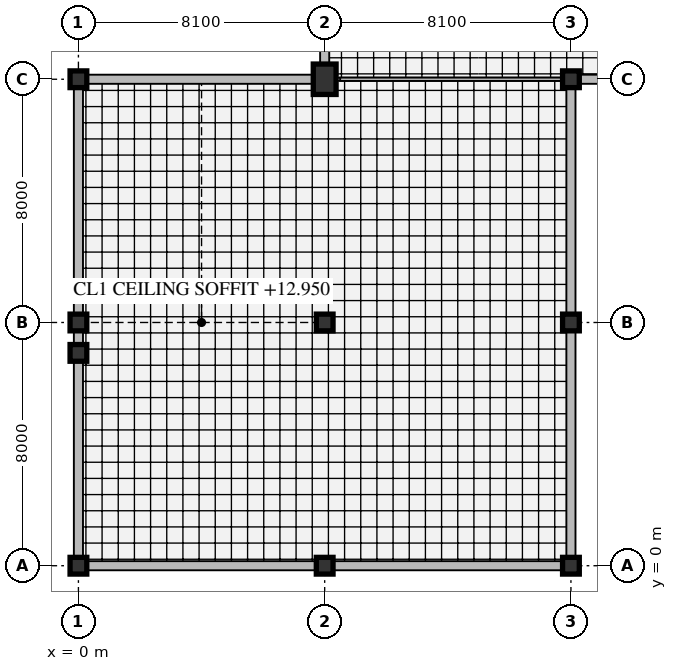
"""IFC4 building model, lengths in metres.
Left out: names, types, materials, properties, quantities, classifications, styles, units other than length and angle.
Written with IfcOpenShell. Run it as: python <this file> out.ifc"""

import sys

from ifc_helpers import new_model, si_unit, direction, frame, frame_2d, origin, origin_with_axes, origin_2d, place, context, subcontext, project, spatial, rectangle, extrude, element, fill, save


model = new_model("IFC4")
c1 = context("Model", 3, precision=1e-05, world=origin(), true_north=direction((0.0, 1.0)))
c2 = subcontext(c1, "Body", "Model", "MODEL_VIEW")
j1 = project(units=[si_unit("LENGTHUNIT", "METRE"), si_unit("PLANEANGLEUNIT", "RADIAN")], contexts=[c1])
p1 = place(None, origin())
s1 = spatial("IfcSite", under=j1, at=p1, CompositionType="ELEMENT")
p2 = place(p1, origin())
s2 = spatial("IfcBuilding", under=s1, at=p2, CompositionType="ELEMENT")
p3 = place(p2, frame((0.0, 0.0, 10.2)))
s3 = spatial("IfcBuildingStorey", under=s2, at=p3, CompositionType="ELEMENT", Elevation=10.2)
p4 = place(p3, origin_with_axes())
e1 = element("IfcColumn", 1, at=p4, inside=s3, PredefinedType="COLUMN", context=c2, shape_type="SweptSolid", body=[
    extrude(rectangle(XDim=0.55, YDim=0.55, at=origin_2d()), origin(), (0.0, 0.0, 1.0), 4.24),
])
for number, where, z_axis, x_axis in (
    (2, (0.0, 7.0, 0.0), (0.0, 0.0, 1.0), (1.0, 0.0, 0.0)),
    (3, (0.0, 8.0, 0.0), (0.0, 0.0, 1.0), (1.0, 0.0, 0.0)),
    (4, (0.0, 16.0, 0.0), (0.0, 0.0, 1.0), (1.0, 0.0, 0.0)),
):
    element("IfcColumn", number, at=place(p3, frame(where, z_axis=z_axis, x_axis=x_axis)), inside=s3, PredefinedType="COLUMN", context=c2, shape_type="SweptSolid", body=[
        extrude(rectangle(XDim=0.55, YDim=0.55, at=origin_2d()), origin(), (0.0, 0.0, 1.0), 4.16),
    ])
p5 = place(p3, frame((8.1, 0.0, 0.0), z_axis=(0.0, 0.0, 1.0), x_axis=(1.0, 0.0, 0.0)))
e5 = element("IfcColumn", 5, at=p5, inside=s3, PredefinedType="COLUMN", context=c2, shape_type="SweptSolid", body=[
    extrude(rectangle(XDim=0.55, YDim=0.55, at=origin_2d()), origin(), (0.0, 0.0, 1.0), 4.24),
])
p6 = place(p3, frame((8.1, 8.0, 0.0), z_axis=(0.0, 0.0, 1.0), x_axis=(1.0, 0.0, 0.0)))
e6 = element("IfcColumn", 6, at=p6, inside=s3, PredefinedType="COLUMN", context=c2, shape_type="SweptSolid", body=[
    extrude(rectangle(XDim=0.55, YDim=0.55, at=origin_2d()), origin(), (0.0, 0.0, 1.0), 4.16),
])
p7 = place(p3, frame((8.1, 16.0, 0.0), z_axis=(0.0, 0.0, 1.0), x_axis=(1.0, 0.0, 0.0)))
e7 = element("IfcColumn", 7, at=p7, inside=s3, PredefinedType="COLUMN", context=c2, shape_type="SweptSolid", body=[
    extrude(rectangle(XDim=0.75, YDim=1.0, at=origin_2d()), origin(), (0.0, 0.0, 1.0), 4.5),
])
for number, where, z_axis, x_axis in (
    (8, (16.2, 0.0, 0.0), (0.0, 0.0, 1.0), (1.0, 0.0, 0.0)),
    (9, (16.2, 8.0, 0.0), (0.0, 0.0, 1.0), (1.0, 0.0, 0.0)),
    (10, (16.2, 16.0, 0.0), (0.0, 0.0, 1.0), (1.0, 0.0, 0.0)),
):
    element("IfcColumn", number, at=place(p3, frame(where, z_axis=z_axis, x_axis=x_axis)), inside=s3, PredefinedType="COLUMN", context=c2, shape_type="SweptSolid", body=[
        extrude(rectangle(XDim=0.55, YDim=0.55, at=origin_2d()), origin(), (0.0, 0.0, 1.0), 4.24),
    ])
p8 = place(p3, frame((0.0, 16.0, 0.0), z_axis=(0.0, 0.0, 1.0), x_axis=(0.0, -1.0, 0.0)))
e11 = element("IfcWall", 11, at=p8, inside=s3, PredefinedType="SOLIDWALL", context=c2, shape_type="SweptSolid", body=[
    extrude(rectangle(XDim=16.0, YDim=0.3, at=frame_2d((8.0, 0.0))), origin(), (0.0, 0.0, 1.0), 3.652),
])
p9 = place(p3, origin_with_axes())
e12 = element("IfcWall", 12, at=p9, inside=s3, PredefinedType="SOLIDWALL", context=c2, shape_type="SweptSolid", body=[
    extrude(rectangle(XDim=16.2, YDim=0.3, at=frame_2d((8.1, 0.0))), origin(), (0.0, 0.0, 1.0), 4.24),
])
p10 = place(p3, frame((16.2, 0.0, 0.0), z_axis=(0.0, 0.0, 1.0), x_axis=(0.0, 1.0, 0.0)))
e13 = element("IfcWall", 13, at=p10, inside=s3, PredefinedType="SOLIDWALL", context=c2, shape_type="SweptSolid", body=[
    extrude(rectangle(XDim=16.0, YDim=0.3, at=frame_2d((8.0, 0.0))), origin(), (0.0, 0.0, 1.0), 3.769),
])
p11 = place(p3, frame((16.2, 16.0, 0.0), z_axis=(0.0, 0.0, 1.0), x_axis=(1.0, 0.0, 0.0)))
e14 = element("IfcWall", 14, at=p11, inside=s3, PredefinedType="SOLIDWALL", context=c2, shape_type="SweptSolid", body=[
    extrude(rectangle(XDim=16.2, YDim=0.3, at=frame_2d((8.1, 0.0))), origin(), (0.0, 0.0, 1.0), 3.544),
])
p12 = place(p3, frame((8.1, 25.0, 0.0), z_axis=(0.0, 0.0, 1.0), x_axis=(0.0, -1.0, 0.0)))
e15 = element("IfcWall", 15, at=p12, inside=s3, PredefinedType="SOLIDWALL", context=c2, shape_type="SweptSolid", body=[
    extrude(rectangle(XDim=9.0, YDim=0.3, at=frame_2d((4.5, 0.0))), origin(), (0.0, 0.0, 1.0), 3.366),
])
p13 = place(p12, frame((3.6, 0.0, 0.95)))
e16 = element("IfcOpeningElement", 16, at=p13, cuts=e15, PredefinedType="OPENING", context=c2, shape_type="SweptSolid", body=[
    extrude(rectangle(XDim=2.25, YDim=1.8, at=frame_2d((1.125, 0.9))), frame((0.0, 0.16, 0.0), z_axis=(0.0, -1.0, 0.0), x_axis=(1.0, 0.0, 0.0)), (0.0, 0.0, 1.0), 0.32),
])
p14 = place(p3, frame((8.1, 16.0, 0.0), z_axis=(0.0, 0.0, 1.0), x_axis=(-1.0, 0.0, 0.0)))
e17 = element("IfcWall", 17, at=p14, inside=s3, PredefinedType="SOLIDWALL", context=c2, shape_type="SweptSolid", body=[
    extrude(rectangle(XDim=8.1, YDim=0.3, at=frame_2d((4.05, 0.0))), origin(), (0.0, 0.0, 1.0), 3.619),
])
p15 = place(p14, frame((2.7, 0.0, 0.95)))
e18 = element("IfcOpeningElement", 18, at=p15, cuts=e17, PredefinedType="OPENING", context=c2, shape_type="SweptSolid", body=[
    extrude(rectangle(XDim=2.4, YDim=1.6, at=frame_2d((1.2, 0.8))), frame((0.0, 0.16, 0.0), z_axis=(0.0, -1.0, 0.0), x_axis=(1.0, 0.0, 0.0)), (0.0, 0.0, 1.0), 0.32),
])
p16 = place(p3, frame((8.608, 16.0, 0.0), z_axis=(0.0, 0.0, 1.0), x_axis=(1.0, 0.0, 0.0)))
e19 = element("IfcWall", 19, at=p16, inside=s3, PredefinedType="PARTITIONING", context=c2, shape_type="SweptSolid", body=[
    extrude(rectangle(XDim=7.309, YDim=0.11, at=frame_2d((3.655, 0.0))), origin(), (0.0, 0.0, 1.0), 3.62),
])
p17 = place(p16, frame((3.179, 0.0, 0.0)))
e20 = element("IfcOpeningElement", 20, at=p17, cuts=e19, PredefinedType="OPENING", context=c2, shape_type="SweptSolid", body=[
    extrude(rectangle(XDim=0.95, YDim=2.15, at=frame_2d((0.475, 1.075))), frame((0.0, 0.065, 0.0), z_axis=(0.0, -1.0, 0.0), x_axis=(1.0, 0.0, 0.0)), (0.0, 0.0, 1.0), 0.13),
])
p18 = place(p15, origin())
e21 = element("IfcWindow", 21, at=p18, inside=s3, PartitioningType="TRIPLE_PANEL_VERTICAL", PredefinedType="WINDOW", context=c2, shape_type="SweptSolid", body=[
    extrude(rectangle(XDim=2.4, YDim=1.6, at=frame_2d((1.2, 0.8))), frame((0.0, 0.03, 0.0), z_axis=(0.0, -1.0, 0.0), x_axis=(1.0, 0.0, 0.0)), (0.0, 0.0, 1.0), 0.06),
])
fill(e18, e21)
p19 = place(p17, frame((0.95, 0.0, 0.0), z_axis=(0.0, 0.0, 1.0), x_axis=(-1.0, 0.0, 0.0)))
e22 = element("IfcDoor", 22, at=p19, inside=s3, OperationType="SINGLE_SWING_RIGHT", PredefinedType="DOOR", context=c2, shape_type="SweptSolid", body=[
    extrude(rectangle(XDim=0.95, YDim=2.15, at=frame_2d((0.475, 1.075))), frame((0.0, 0.025, 0.0), z_axis=(0.0, -1.0, 0.0), x_axis=(1.0, 0.0, 0.0)), (0.0, 0.0, 1.0), 0.05),
])
fill(e20, e22)
save(model, sys.argv[1])
